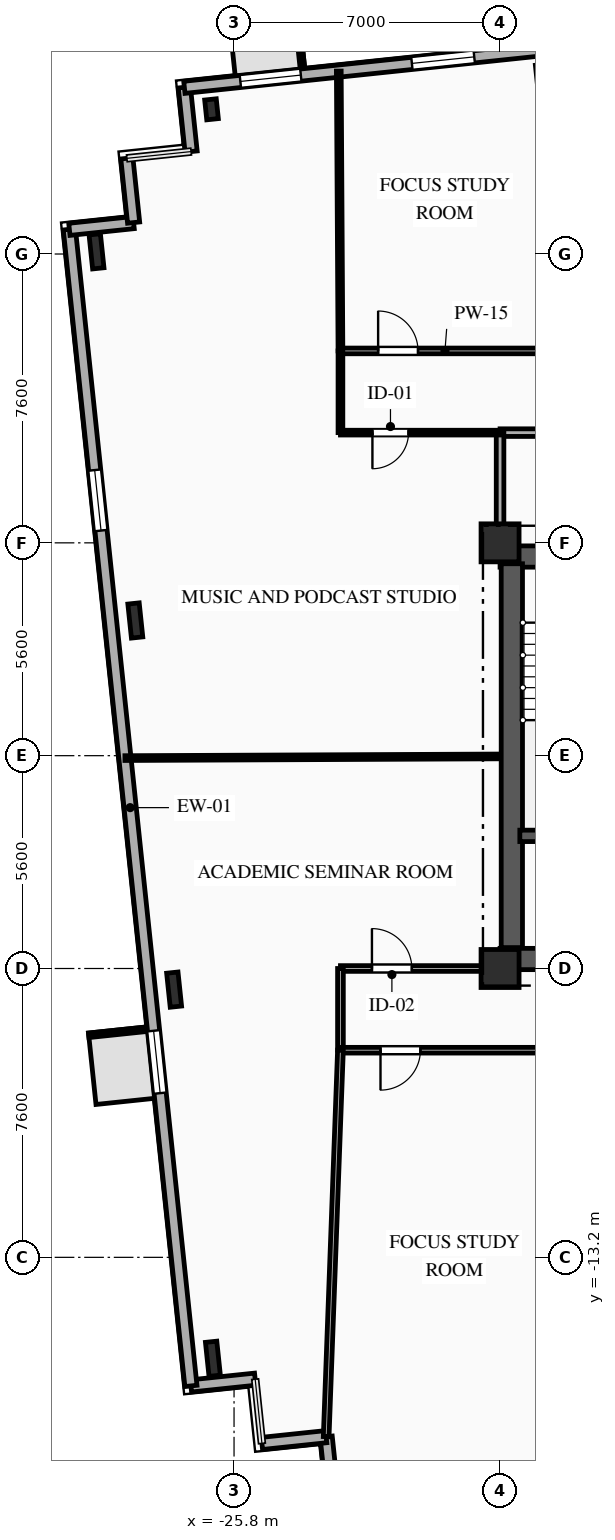
"""IFC4 building model, lengths in metres.
Left out: names, types, materials, properties, quantities, classifications, styles, units other than length and angle.
Written with IfcOpenShell. Run it as: python <this file> out.ifc"""

import sys

from ifc_helpers import new_model, si_unit, direction, frame, frame_2d, origin, origin_2d, place, context, subcontext, project, spatial, rectangle, i_section, extrude, element, fill, save


model = new_model("IFC4")
c1 = context("Model", 3, precision=1e-05, world=origin(), true_north=direction((0.0, 1.0)))
c2 = subcontext(c1, "Body", "Model", "MODEL_VIEW")
j1 = project(units=[si_unit("LENGTHUNIT", "METRE"), si_unit("PLANEANGLEUNIT", "RADIAN")], contexts=[c1])
p1 = place(None, origin())
s1 = spatial("IfcSite", under=j1, at=p1, CompositionType="ELEMENT")
p2 = place(p1, origin())
s2 = spatial("IfcBuilding", under=s1, at=p2, CompositionType="ELEMENT")
p3 = place(p2, frame((0.0, 0.0, 105.8)))
s3 = spatial("IfcBuildingStorey", under=s2, at=p3, CompositionType="ELEMENT", Elevation=105.8)
for number, where, z_axis, x_axis in (
    (1, (-18.8, -5.6, 0.0), (0.0, 0.0, 1.0), (1.0, 0.0, 0.0)),
    (2, (-18.8, 5.6, 0.0), (0.0, 0.0, 1.0), (1.0, 0.0, 0.0)),
):
    element("IfcColumn", number, at=place(p3, frame(where, z_axis=z_axis, x_axis=x_axis)), inside=s3, PredefinedType="COLUMN", context=c2, shape_type="SweptSolid", body=[
        extrude(rectangle(XDim=1.0, YDim=1.0, at=origin_2d()), origin(), (0.0, 0.0, 1.0), 3.35),
    ])
p4 = place(p3, frame((-26.393, 17.007, 0.0), z_axis=(0.0, 0.0, 1.0), x_axis=(0.994521895368, 0.104528463268, 0.0)))
e3 = element("IfcColumn", 3, at=p4, inside=s3, PredefinedType="COLUMN", context=c2, shape_type="SweptSolid", body=[
    extrude(i_section(OverallWidth=0.306, OverallDepth=0.524, WebThickness=0.021, FlangeThickness=0.04, FilletRadius=0.027, at=origin_2d()), origin(), (0.0, 0.0, 1.0), 3.35),
])
for number, where, z_axis, x_axis in (
    (4, (-29.419, 13.271, 0.0), (0.0, 0.0, 1.0), (0.995, 0.105, 0.0)),
    (5, (-28.398, 3.557, 0.0), (0.0, 0.0, 1.0), (0.995, 0.105, 0.0)),
    (6, (-27.377, -6.156, 0.0), (0.0, 0.0, 1.0), (0.995, 0.105, 0.0)),
    (7, (-26.356, -15.869, 0.0), (0.0, 0.0, 1.0), (0.995, 0.105, 0.0)),
):
    element("IfcColumn", number, at=place(p3, frame(where, z_axis=z_axis, x_axis=x_axis)), inside=s3, PredefinedType="COLUMN", context=c2, shape_type="SweptSolid", body=[
        extrude(i_section(OverallWidth=0.3, OverallDepth=0.9, WebThickness=0.019, FlangeThickness=0.035, FilletRadius=0.03, at=origin_2d()), origin(), (0.0, 0.0, 1.0), 3.35),
    ])
for number, where, z_axis, x_axis in (
    (8, (-23.198, -19.609, 0.0), (0.0, 0.0, 1.0), (-0.105, 0.995, 0.0)),
    (9, (-23.376, -17.919, 0.0), (0.0, 0.0, 1.0), (-0.995, -0.105, 0.0)),
):
    element("IfcWall", number, at=place(p3, frame(where, z_axis=z_axis, x_axis=x_axis)), inside=s3, PredefinedType="SOLIDWALL", context=c2, shape_type="SweptSolid", body=[
        extrude(rectangle(XDim=1.7, YDim=0.32, at=frame_2d((0.85, 0.0))), origin(), (0.0, 0.0, 1.0), 3.045),
    ])
p5 = place(p3, frame((-25.244, -16.406, 0.0), z_axis=(0.0, 0.0, 1.0), x_axis=(-0.994521177842, -0.104535289845, 0.0)))
e10 = element("IfcWall", 10, at=p5, inside=s3, PredefinedType="SOLIDWALL", context=c2, shape_type="SweptSolid", body=[
    extrude(rectangle(XDim=1.7, YDim=0.32, at=frame_2d((0.85, 0.0))), origin(), (0.0, 0.0, 1.0), 3.045),
])
p6 = place(p3, frame((-26.935, -16.583, 0.0), z_axis=(0.0, 0.0, 1.0), x_axis=(-0.104524887486, 0.994522271192, 0.0)))
e11 = element("IfcWall", 11, at=p6, inside=s3, PredefinedType="SOLIDWALL", context=c2, shape_type="SweptSolid", body=[
    extrude(rectangle(XDim=30.6, YDim=0.32, at=frame_2d((15.3, 0.0))), origin(), (0.0, 0.0, 1.0), 3.045),
])
p7 = place(p6, frame((7.746, 0.0, 0.85)))
e12 = element("IfcOpeningElement", 12, at=p7, cuts=e11, PredefinedType="OPENING", context=c2, shape_type="SweptSolid", body=[
    extrude(rectangle(XDim=1.65, YDim=1.85, at=frame_2d((0.825, 0.925))), frame((0.0, 0.17, 0.0), z_axis=(0.0, -1.0, 0.0), x_axis=(1.0, 0.0, 0.0)), (0.0, 0.0, 1.0), 0.34),
])
p8 = place(p6, frame((22.631, 0.0, 0.85)))
e13 = element("IfcOpeningElement", 13, at=p8, cuts=e11, PredefinedType="OPENING", context=c2, shape_type="SweptSolid", body=[
    extrude(rectangle(XDim=1.6, YDim=1.85, at=frame_2d((0.8, 0.925))), frame((0.0, 0.17, 0.0), z_axis=(0.0, -1.0, 0.0), x_axis=(1.0, 0.0, 0.0)), (0.0, 0.0, 1.0), 0.34),
])
for number, where, z_axis, x_axis in (
    (14, (-30.133, 13.849, 0.0), (0.0, 0.0, 1.0), (0.995, 0.104, 0.0)),
    (15, (-28.443, 14.027, 0.0), (0.0, 0.0, 1.0), (-0.105, 0.995, 0.0)),
    (16, (-26.93, 15.895, 0.0), (0.0, 0.0, 1.0), (-0.105, 0.995, 0.0)),
):
    element("IfcWall", number, at=place(p3, frame(where, z_axis=z_axis, x_axis=x_axis)), inside=s3, PredefinedType="SOLIDWALL", context=c2, shape_type="SweptSolid", body=[
        extrude(rectangle(XDim=1.7, YDim=0.32, at=frame_2d((0.85, 0.0))), origin(), (0.0, 0.0, 1.0), 3.045),
    ])
p9 = place(p3, frame((-27.107, 17.586, 0.0), z_axis=(0.0, 0.0, 1.0), x_axis=(0.994521628355, 0.104531003701, 0.0)))
e17 = element("IfcWall", 17, at=p9, inside=s3, PredefinedType="SOLIDWALL", context=c2, shape_type="SweptSolid", body=[
    extrude(rectangle(XDim=53.8, YDim=0.32, at=frame_2d((26.9, 0.0))), origin(), (0.0, 0.0, 1.0), 3.045),
])
p10 = place(p9, frame((1.482, 0.0, 0.85)))
e18 = element("IfcOpeningElement", 18, at=p10, cuts=e17, PredefinedType="OPENING", context=c2, shape_type="SweptSolid", body=[
    extrude(rectangle(XDim=1.6, YDim=1.85, at=frame_2d((0.8, 0.925))), frame((0.0, 0.17, 0.0), z_axis=(0.0, -1.0, 0.0), x_axis=(1.0, 0.0, 0.0)), (0.0, 0.0, 1.0), 0.34),
])
p11 = place(p9, frame((6.02, 0.0, 0.85)))
e19 = element("IfcOpeningElement", 19, at=p11, cuts=e17, PredefinedType="OPENING", context=c2, shape_type="SweptSolid", body=[
    extrude(rectangle(XDim=1.65, YDim=1.85, at=frame_2d((0.825, 0.925))), frame((0.0, 0.17, 0.0), z_axis=(0.0, -1.0, 0.0), x_axis=(1.0, 0.0, 0.0)), (0.0, 0.0, 1.0), 0.34),
])
p12 = place(p9, frame((11.584, 0.0, 0.85)))
e20 = element("IfcOpeningElement", 20, at=p12, cuts=e17, PredefinedType="OPENING", context=c2, shape_type="SweptSolid", body=[
    extrude(rectangle(XDim=1.65, YDim=1.85, at=frame_2d((0.825, 0.925))), frame((0.0, 0.17, 0.0), z_axis=(0.0, -1.0, 0.0), x_axis=(1.0, 0.0, 0.0)), (0.0, 0.0, 1.0), 0.34),
])
p13 = place(p9, frame((21.336, 0.0, 0.85)))
e21 = element("IfcOpeningElement", 21, at=p13, cuts=e17, PredefinedType="OPENING", context=c2, shape_type="SweptSolid", body=[
    extrude(rectangle(XDim=1.6, YDim=1.85, at=frame_2d((0.8, 0.925))), frame((0.0, 0.17, 0.0), z_axis=(0.0, -1.0, 0.0), x_axis=(1.0, 0.0, 0.0)), (0.0, 0.0, 1.0), 0.34),
])
p14 = place(p9, frame((31.404, 0.0, 0.85)))
e22 = element("IfcOpeningElement", 22, at=p14, cuts=e17, PredefinedType="OPENING", context=c2, shape_type="SweptSolid", body=[
    extrude(rectangle(XDim=2.2, YDim=1.85, at=frame_2d((1.1, 0.925))), frame((0.0, 0.17, 0.0), z_axis=(0.0, -1.0, 0.0), x_axis=(1.0, 0.0, 0.0)), (0.0, 0.0, 1.0), 0.34),
])
p15 = place(p9, frame((40.486, 0.0, 0.85)))
e23 = element("IfcOpeningElement", 23, at=p15, cuts=e17, PredefinedType="OPENING", context=c2, shape_type="SweptSolid", body=[
    extrude(rectangle(XDim=1.65, YDim=1.85, at=frame_2d((0.825, 0.925))), frame((0.0, 0.17, 0.0), z_axis=(0.0, -1.0, 0.0), x_axis=(1.0, 0.0, 0.0)), (0.0, 0.0, 1.0), 0.34),
])
p16 = place(p9, frame((46.53, 0.0, 0.85)))
e24 = element("IfcOpeningElement", 24, at=p16, cuts=e17, PredefinedType="OPENING", context=c2, shape_type="SweptSolid", body=[
    extrude(rectangle(XDim=1.65, YDim=1.85, at=frame_2d((0.825, 0.925))), frame((0.0, 0.17, 0.0), z_axis=(0.0, -1.0, 0.0), x_axis=(1.0, 0.0, 0.0)), (0.0, 0.0, 1.0), 0.34),
])
p17 = place(p9, frame((51.054, 0.0, 0.85)))
e25 = element("IfcOpeningElement", 25, at=p17, cuts=e17, PredefinedType="OPENING", context=c2, shape_type="SweptSolid", body=[
    extrude(rectangle(XDim=1.65, YDim=1.85, at=frame_2d((0.825, 0.925))), frame((0.0, 0.17, 0.0), z_axis=(0.0, -1.0, 0.0), x_axis=(1.0, 0.0, 0.0)), (0.0, 0.0, 1.0), 0.34),
])
p18 = place(p3, frame((30.307, -13.986, 0.0), z_axis=(0.0, 0.0, 1.0), x_axis=(-0.994521628355, -0.104531003701, 0.0)))
e26 = element("IfcWall", 26, at=p18, inside=s3, PredefinedType="SOLIDWALL", context=c2, shape_type="SweptSolid", body=[
    extrude(rectangle(XDim=53.8, YDim=0.32, at=frame_2d((26.9, 0.0))), origin(), (0.0, 0.0, 1.0), 3.045),
])
p19 = place(p18, frame((3.098, 0.0, 0.85)))
e27 = element("IfcOpeningElement", 27, at=p19, cuts=e26, PredefinedType="OPENING", context=c2, shape_type="SweptSolid", body=[
    extrude(rectangle(XDim=1.65, YDim=1.85, at=frame_2d((0.825, 0.925))), frame((0.0, 0.17, 0.0), z_axis=(0.0, -1.0, 0.0), x_axis=(1.0, 0.0, 0.0)), (0.0, 0.0, 1.0), 0.34),
])
p20 = place(p18, frame((9.302, 0.0, 0.85)))
e28 = element("IfcOpeningElement", 28, at=p20, cuts=e26, PredefinedType="OPENING", context=c2, shape_type="SweptSolid", body=[
    extrude(rectangle(XDim=1.65, YDim=1.85, at=frame_2d((0.825, 0.925))), frame((0.0, 0.17, 0.0), z_axis=(0.0, -1.0, 0.0), x_axis=(1.0, 0.0, 0.0)), (0.0, 0.0, 1.0), 0.34),
])
p21 = place(p18, frame((14.827, 0.0, 0.85)))
e29 = element("IfcOpeningElement", 29, at=p21, cuts=e26, PredefinedType="OPENING", context=c2, shape_type="SweptSolid", body=[
    extrude(rectangle(XDim=1.65, YDim=1.85, at=frame_2d((0.825, 0.925))), frame((0.0, 0.17, 0.0), z_axis=(0.0, -1.0, 0.0), x_axis=(1.0, 0.0, 0.0)), (0.0, 0.0, 1.0), 0.34),
])
p22 = place(p18, frame((23.078, 0.0, 0.85)))
e30 = element("IfcOpeningElement", 30, at=p22, cuts=e26, PredefinedType="OPENING", context=c2, shape_type="SweptSolid", body=[
    extrude(rectangle(XDim=2.2, YDim=1.85, at=frame_2d((1.1, 0.925))), frame((0.0, 0.17, 0.0), z_axis=(0.0, -1.0, 0.0), x_axis=(1.0, 0.0, 0.0)), (0.0, 0.0, 1.0), 0.34),
])
p23 = place(p18, frame((34.646, 0.0, 0.85)))
e31 = element("IfcOpeningElement", 31, at=p23, cuts=e26, PredefinedType="OPENING", context=c2, shape_type="SweptSolid", body=[
    extrude(rectangle(XDim=2.2, YDim=1.85, at=frame_2d((1.1, 0.925))), frame((0.0, 0.17, 0.0), z_axis=(0.0, -1.0, 0.0), x_axis=(1.0, 0.0, 0.0)), (0.0, 0.0, 1.0), 0.34),
])
p24 = place(p18, frame((43.728, 0.0, 0.85)))
e32 = element("IfcOpeningElement", 32, at=p24, cuts=e26, PredefinedType="OPENING", context=c2, shape_type="SweptSolid", body=[
    extrude(rectangle(XDim=1.65, YDim=1.85, at=frame_2d((0.825, 0.925))), frame((0.0, 0.17, 0.0), z_axis=(0.0, -1.0, 0.0), x_axis=(1.0, 0.0, 0.0)), (0.0, 0.0, 1.0), 0.34),
])
p25 = place(p18, frame((49.653, 0.0, 0.85)))
e33 = element("IfcOpeningElement", 33, at=p25, cuts=e26, PredefinedType="OPENING", context=c2, shape_type="SweptSolid", body=[
    extrude(rectangle(XDim=1.65, YDim=1.85, at=frame_2d((0.825, 0.925))), frame((0.0, 0.17, 0.0), z_axis=(0.0, -1.0, 0.0), x_axis=(1.0, 0.0, 0.0)), (0.0, 0.0, 1.0), 0.34),
])
p26 = place(p3, frame((-18.8, 5.24, 0.0), z_axis=(0.0, 0.0, 1.0), x_axis=(1.0, 0.0, 0.0)))
e34 = element("IfcWall", 34, at=p26, inside=s3, PredefinedType="SHEAR", context=c2, shape_type="SweptSolid", body=[
    extrude(rectangle(XDim=9.6, YDim=0.56, at=frame_2d((4.8, 0.0))), origin(), (0.0, 0.0, 1.0), 3.045),
])
p27 = place(p26, frame((1.55, 0.0, 0.0)))
e35 = element("IfcOpeningElement", 35, at=p27, cuts=e34, PredefinedType="OPENING", context=c2, shape_type="SweptSolid", body=[
    extrude(rectangle(XDim=1.1, YDim=2.15, at=frame_2d((0.55, 1.075))), frame((0.0, 0.29, 0.0), z_axis=(0.0, -1.0, 0.0), x_axis=(1.0, 0.0, 0.0)), (0.0, 0.0, 1.0), 0.58),
])
p28 = place(p26, frame((4.775, 0.0, 0.0)))
e36 = element("IfcOpeningElement", 36, at=p28, cuts=e34, PredefinedType="OPENING", context=c2, shape_type="SweptSolid", body=[
    extrude(rectangle(XDim=1.05, YDim=2.1, at=frame_2d((0.525, 1.05))), frame((0.0, 0.29, 0.0), z_axis=(0.0, -1.0, 0.0), x_axis=(1.0, 0.0, 0.0)), (0.0, 0.0, 1.0), 0.58),
])
p29 = place(p3, frame((-18.8, -5.35, 0.0), z_axis=(0.0, 0.0, 1.0), x_axis=(1.0, 0.0, 0.0)))
e37 = element("IfcWall", 37, at=p29, inside=s3, PredefinedType="SHEAR", context=c2, shape_type="SweptSolid", body=[
    extrude(rectangle(XDim=9.6, YDim=0.56, at=frame_2d((4.8, 0.0))), origin(), (0.0, 0.0, 1.0), 3.045),
])
p30 = place(p29, frame((1.05, 0.0, 0.0)))
e38 = element("IfcOpeningElement", 38, at=p30, cuts=e37, PredefinedType="OPENING", context=c2, shape_type="SweptSolid", body=[
    extrude(rectangle(XDim=0.9, YDim=2.1, at=frame_2d((0.45, 1.05))), frame((0.0, 0.29, 0.0), z_axis=(0.0, -1.0, 0.0), x_axis=(1.0, 0.0, 0.0)), (0.0, 0.0, 1.0), 0.58),
])
p31 = place(p3, frame((-18.49, -5.05, 0.0), z_axis=(0.0, 0.0, 1.0), x_axis=(0.0, 1.0, 0.0)))
e39 = element("IfcWall", 39, at=p31, inside=s3, PredefinedType="SHEAR", context=c2, shape_type="SweptSolid", body=[
    extrude(rectangle(XDim=10.1, YDim=0.56, at=frame_2d((5.05, 0.0))), origin(), (0.0, 0.0, 1.0), 3.045),
])
p32 = place(p3, frame((-18.28, -2.11, 0.0), z_axis=(0.0, 0.0, 1.0), x_axis=(1.0, 0.0, 0.0)))
e40 = element("IfcWall", 40, at=p32, inside=s3, PredefinedType="SHEAR", context=c2, shape_type="SweptSolid", body=[
    extrude(rectangle(XDim=3.18, YDim=0.3, at=frame_2d((1.59, 0.0))), origin(), (0.0, 0.0, 1.0), 3.045),
])
p33 = place(p3, frame((-12.0, 8.5, 0.0), z_axis=(0.0, 0.0, 1.0), x_axis=(-1.0, 0.0, 0.0)))
e41 = element("IfcWall", 41, at=p33, inside=s3, PredefinedType="PARTITIONING", context=c2, shape_type="SweptSolid", body=[
    extrude(rectangle(XDim=6.8, YDim=0.2, at=frame_2d((3.4, 0.0))), origin(), (0.0, 0.0, 1.0), 3.045),
])
p34 = place(p33, frame((1.715, 0.0, 0.0)))
e42 = element("IfcOpeningElement", 42, at=p34, cuts=e41, PredefinedType="OPENING", context=c2, shape_type="SweptSolid", body=[
    extrude(rectangle(XDim=1.1, YDim=2.15, at=frame_2d((0.55, 1.075))), frame((0.0, 0.11, 0.0), z_axis=(0.0, -1.0, 0.0), x_axis=(1.0, 0.0, 0.0)), (0.0, 0.0, 1.0), 0.22),
])
p35 = place(p3, frame((-18.8, 8.5, 0.0), z_axis=(0.0, 0.0, 1.0), x_axis=(0.0, -1.0, 0.0)))
e43 = element("IfcWall", 43, at=p35, inside=s3, PredefinedType="PARTITIONING", context=c2, shape_type="SweptSolid", body=[
    extrude(rectangle(XDim=2.9, YDim=0.2, at=frame_2d((1.45, 0.0))), origin(), (0.0, 0.0, 1.0), 2.53),
])
p36 = place(p3, frame((-18.8, 8.5, 0.0), z_axis=(0.0, 0.0, 1.0), x_axis=(-1.0, 0.0, 0.0)))
e44 = element("IfcWall", 44, at=p36, inside=s3, PredefinedType="PARTITIONING", context=c2, shape_type="SweptSolid", body=[
    extrude(rectangle(XDim=4.2, YDim=0.125, at=frame_2d((2.1, 0.0))), origin(), (0.0, 0.0, 1.0), 3.045),
])
p37 = place(p36, frame((2.409, 0.0, 0.0)))
e45 = element("IfcOpeningElement", 45, at=p37, cuts=e44, PredefinedType="OPENING", context=c2, shape_type="SweptSolid", body=[
    extrude(rectangle(XDim=0.95, YDim=2.1, at=frame_2d((0.475, 1.05))), frame((0.0, 0.073, 0.0), z_axis=(0.0, -1.0, 0.0), x_axis=(1.0, 0.0, 0.0)), (0.0, 0.0, 1.0), 0.145),
])
p38 = place(p3, frame((-23.0, 8.5, 0.0), z_axis=(0.0, 0.0, 1.0), x_axis=(0.0, 1.0, 0.0)))
e46 = element("IfcWall", 46, at=p38, inside=s3, PredefinedType="PARTITIONING", context=c2, shape_type="SweptSolid", body=[
    extrude(rectangle(XDim=2.15, YDim=0.125, at=frame_2d((1.075, 0.0))), origin(), (0.0, 0.0, 1.0), 3.045),
])
p39 = place(p3, frame((-23.0, 10.65, 0.0), z_axis=(0.0, 0.0, 1.0), x_axis=(1.0, 0.0, 0.0)))
e47 = element("IfcWall", 47, at=p39, inside=s3, PredefinedType="PARTITIONING", context=c2, shape_type="SweptSolid", body=[
    extrude(rectangle(XDim=5.5, YDim=0.15, at=frame_2d((2.75, 0.0))), origin(), (0.0, 0.0, 1.0), 3.045),
])
p40 = place(p39, frame((0.991, 0.0, 0.0)))
e48 = element("IfcOpeningElement", 48, at=p40, cuts=e47, PredefinedType="OPENING", context=c2, shape_type="SweptSolid", body=[
    extrude(rectangle(XDim=1.05, YDim=2.15, at=frame_2d((0.525, 1.075))), frame((0.0, 0.085, 0.0), z_axis=(0.0, -1.0, 0.0), x_axis=(1.0, 0.0, 0.0)), (0.0, 0.0, 1.0), 0.17),
])
p41 = place(p3, frame((-23.0, -5.6, 0.0), z_axis=(0.0, 0.0, 1.0), x_axis=(1.0, 0.0, 0.0)))
e49 = element("IfcWall", 49, at=p41, inside=s3, PredefinedType="PARTITIONING", context=c2, shape_type="SweptSolid", body=[
    extrude(rectangle(XDim=4.2, YDim=0.15, at=frame_2d((2.1, 0.0))), origin(), (0.0, 0.0, 1.0), 3.045),
])
p42 = place(p41, frame((0.829, 0.0, 0.0)))
e50 = element("IfcOpeningElement", 50, at=p42, cuts=e49, PredefinedType="OPENING", context=c2, shape_type="SweptSolid", body=[
    extrude(rectangle(XDim=1.05, YDim=2.15, at=frame_2d((0.525, 1.075))), frame((0.0, 0.085, 0.0), z_axis=(0.0, -1.0, 0.0), x_axis=(1.0, 0.0, 0.0)), (0.0, 0.0, 1.0), 0.17),
])
p43 = place(p3, frame((-23.0, -7.75, 0.0), z_axis=(0.0, 0.0, 1.0), x_axis=(0.0, 1.0, 0.0)))
e51 = element("IfcWall", 51, at=p43, inside=s3, PredefinedType="PARTITIONING", context=c2, shape_type="SweptSolid", body=[
    extrude(rectangle(XDim=2.15, YDim=0.15, at=frame_2d((1.075, 0.0))), origin(), (0.0, 0.0, 1.0), 2.7),
])
p44 = place(p3, frame((-17.0, -7.75, 0.0), z_axis=(0.0, 0.0, 1.0), x_axis=(-1.0, 0.0, 0.0)))
e52 = element("IfcWall", 52, at=p44, inside=s3, PredefinedType="PARTITIONING", context=c2, shape_type="SweptSolid", body=[
    extrude(rectangle(XDim=6.0, YDim=0.15, at=frame_2d((3.0, 0.0))), origin(), (0.0, 0.0, 1.0), 3.045),
])
p45 = place(p44, frame((3.896, 0.0, 0.0)))
e53 = element("IfcOpeningElement", 53, at=p45, cuts=e52, PredefinedType="OPENING", context=c2, shape_type="SweptSolid", body=[
    extrude(rectangle(XDim=1.05, YDim=2.15, at=frame_2d((0.525, 1.075))), frame((0.0, 0.085, 0.0), z_axis=(0.0, -1.0, 0.0), x_axis=(1.0, 0.0, 0.0)), (0.0, 0.0, 1.0), 0.17),
])
p46 = place(p3, frame((-28.671, -0.064, 0.0), z_axis=(0.0, 0.0, 1.0), x_axis=(0.999990089865, 0.004451985263, 0.0)))
e54 = element("IfcWall", 54, at=p46, inside=s3, PredefinedType="PARTITIONING", context=c2, shape_type="SweptSolid", body=[
    extrude(rectangle(XDim=9.871, YDim=0.125, at=frame_2d((4.936, 0.0))), origin(), (0.0, 0.0, 1.0), 3.045),
])
p47 = place(p3, frame((-23.0, -7.75, 0.0), z_axis=(0.0, 0.0, 1.0), x_axis=(-0.036924695214, -0.999318050914, 0.0)))
e55 = element("IfcWall", 55, at=p47, inside=s3, PredefinedType="PARTITIONING", context=c2, shape_type="SweptSolid", body=[
    extrude(rectangle(XDim=10.176, YDim=0.15, at=frame_2d((5.088, 0.0))), origin(), (0.0, 0.0, 1.0), 3.045),
])
p48 = place(p3, frame((-23.044, 18.013, 0.0), z_axis=(0.0, 0.0, 1.0), x_axis=(0.005968459246, -0.999982188588, 0.0)))
e56 = element("IfcWall", 56, at=p48, inside=s3, PredefinedType="PARTITIONING", context=c2, shape_type="SweptSolid", body=[
    extrude(rectangle(XDim=7.363, YDim=0.125, at=frame_2d((3.682, 0.0))), origin(), (0.0, 0.0, 1.0), 3.045),
])
p49 = place(p7, origin())
e57 = element("IfcWindow", 57, at=p49, inside=s3, PartitioningType="SINGLE_PANEL", PredefinedType="WINDOW", context=c2, shape_type="SweptSolid", body=[
    extrude(rectangle(XDim=1.65, YDim=1.85, at=frame_2d((0.825, 0.925))), frame((0.0, 0.03, 0.0), z_axis=(0.0, -1.0, 0.0), x_axis=(1.0, 0.0, 0.0)), (0.0, 0.0, 1.0), 0.06),
])
fill(e12, e57)
p50 = place(p8, origin())
e58 = element("IfcWindow", 58, at=p50, inside=s3, PartitioningType="SINGLE_PANEL", PredefinedType="WINDOW", context=c2, shape_type="SweptSolid", body=[
    extrude(rectangle(XDim=1.6, YDim=1.85, at=frame_2d((0.8, 0.925))), frame((0.0, 0.03, 0.0), z_axis=(0.0, -1.0, 0.0), x_axis=(1.0, 0.0, 0.0)), (0.0, 0.0, 1.0), 0.06),
])
fill(e13, e58)
p51 = place(p10, origin())
e59 = element("IfcWindow", 59, at=p51, inside=s3, PartitioningType="SINGLE_PANEL", PredefinedType="WINDOW", context=c2, shape_type="SweptSolid", body=[
    extrude(rectangle(XDim=1.6, YDim=1.85, at=frame_2d((0.8, 0.925))), frame((0.0, 0.03, 0.0), z_axis=(0.0, -1.0, 0.0), x_axis=(1.0, 0.0, 0.0)), (0.0, 0.0, 1.0), 0.06),
])
fill(e18, e59)
p52 = place(p11, origin())
e60 = element("IfcWindow", 60, at=p52, inside=s3, PartitioningType="SINGLE_PANEL", PredefinedType="WINDOW", context=c2, shape_type="SweptSolid", body=[
    extrude(rectangle(XDim=1.65, YDim=1.85, at=frame_2d((0.825, 0.925))), frame((0.0, 0.03, 0.0), z_axis=(0.0, -1.0, 0.0), x_axis=(1.0, 0.0, 0.0)), (0.0, 0.0, 1.0), 0.06),
])
fill(e19, e60)
p53 = place(p37, origin())
e61 = element("IfcDoor", 61, at=p53, inside=s3, OperationType="SINGLE_SWING_RIGHT", PredefinedType="DOOR", context=c2, shape_type="SweptSolid", body=[
    extrude(rectangle(XDim=0.95, YDim=2.1, at=frame_2d((0.475, 1.05))), frame((0.0, 0.025, 0.0), z_axis=(0.0, -1.0, 0.0), x_axis=(1.0, 0.0, 0.0)), (0.0, 0.0, 1.0), 0.05),
])
fill(e45, e61)
p54 = place(p40, origin())
e62 = element("IfcDoor", 62, at=p54, inside=s3, OperationType="SINGLE_SWING_LEFT", PredefinedType="DOOR", context=c2, shape_type="SweptSolid", body=[
    extrude(rectangle(XDim=1.05, YDim=2.15, at=frame_2d((0.525, 1.075))), frame((0.0, 0.025, 0.0), z_axis=(0.0, -1.0, 0.0), x_axis=(1.0, 0.0, 0.0)), (0.0, 0.0, 1.0), 0.05),
])
fill(e48, e62)
p55 = place(p42, origin())
e63 = element("IfcDoor", 63, at=p55, inside=s3, OperationType="SINGLE_SWING_LEFT", PredefinedType="DOOR", context=c2, shape_type="SweptSolid", body=[
    extrude(rectangle(XDim=1.05, YDim=2.15, at=frame_2d((0.525, 1.075))), frame((0.0, 0.025, 0.0), z_axis=(0.0, -1.0, 0.0), x_axis=(1.0, 0.0, 0.0)), (0.0, 0.0, 1.0), 0.05),
])
fill(e50, e63)
p56 = place(p45, origin())
e64 = element("IfcDoor", 64, at=p56, inside=s3, OperationType="SINGLE_SWING_RIGHT", PredefinedType="DOOR", context=c2, shape_type="SweptSolid", body=[
    extrude(rectangle(XDim=1.05, YDim=2.15, at=frame_2d((0.525, 1.075))), frame((0.0, 0.025, 0.0), z_axis=(0.0, -1.0, 0.0), x_axis=(1.0, 0.0, 0.0)), (0.0, 0.0, 1.0), 0.05),
])
fill(e53, e64)
save(model, sys.argv[1])
